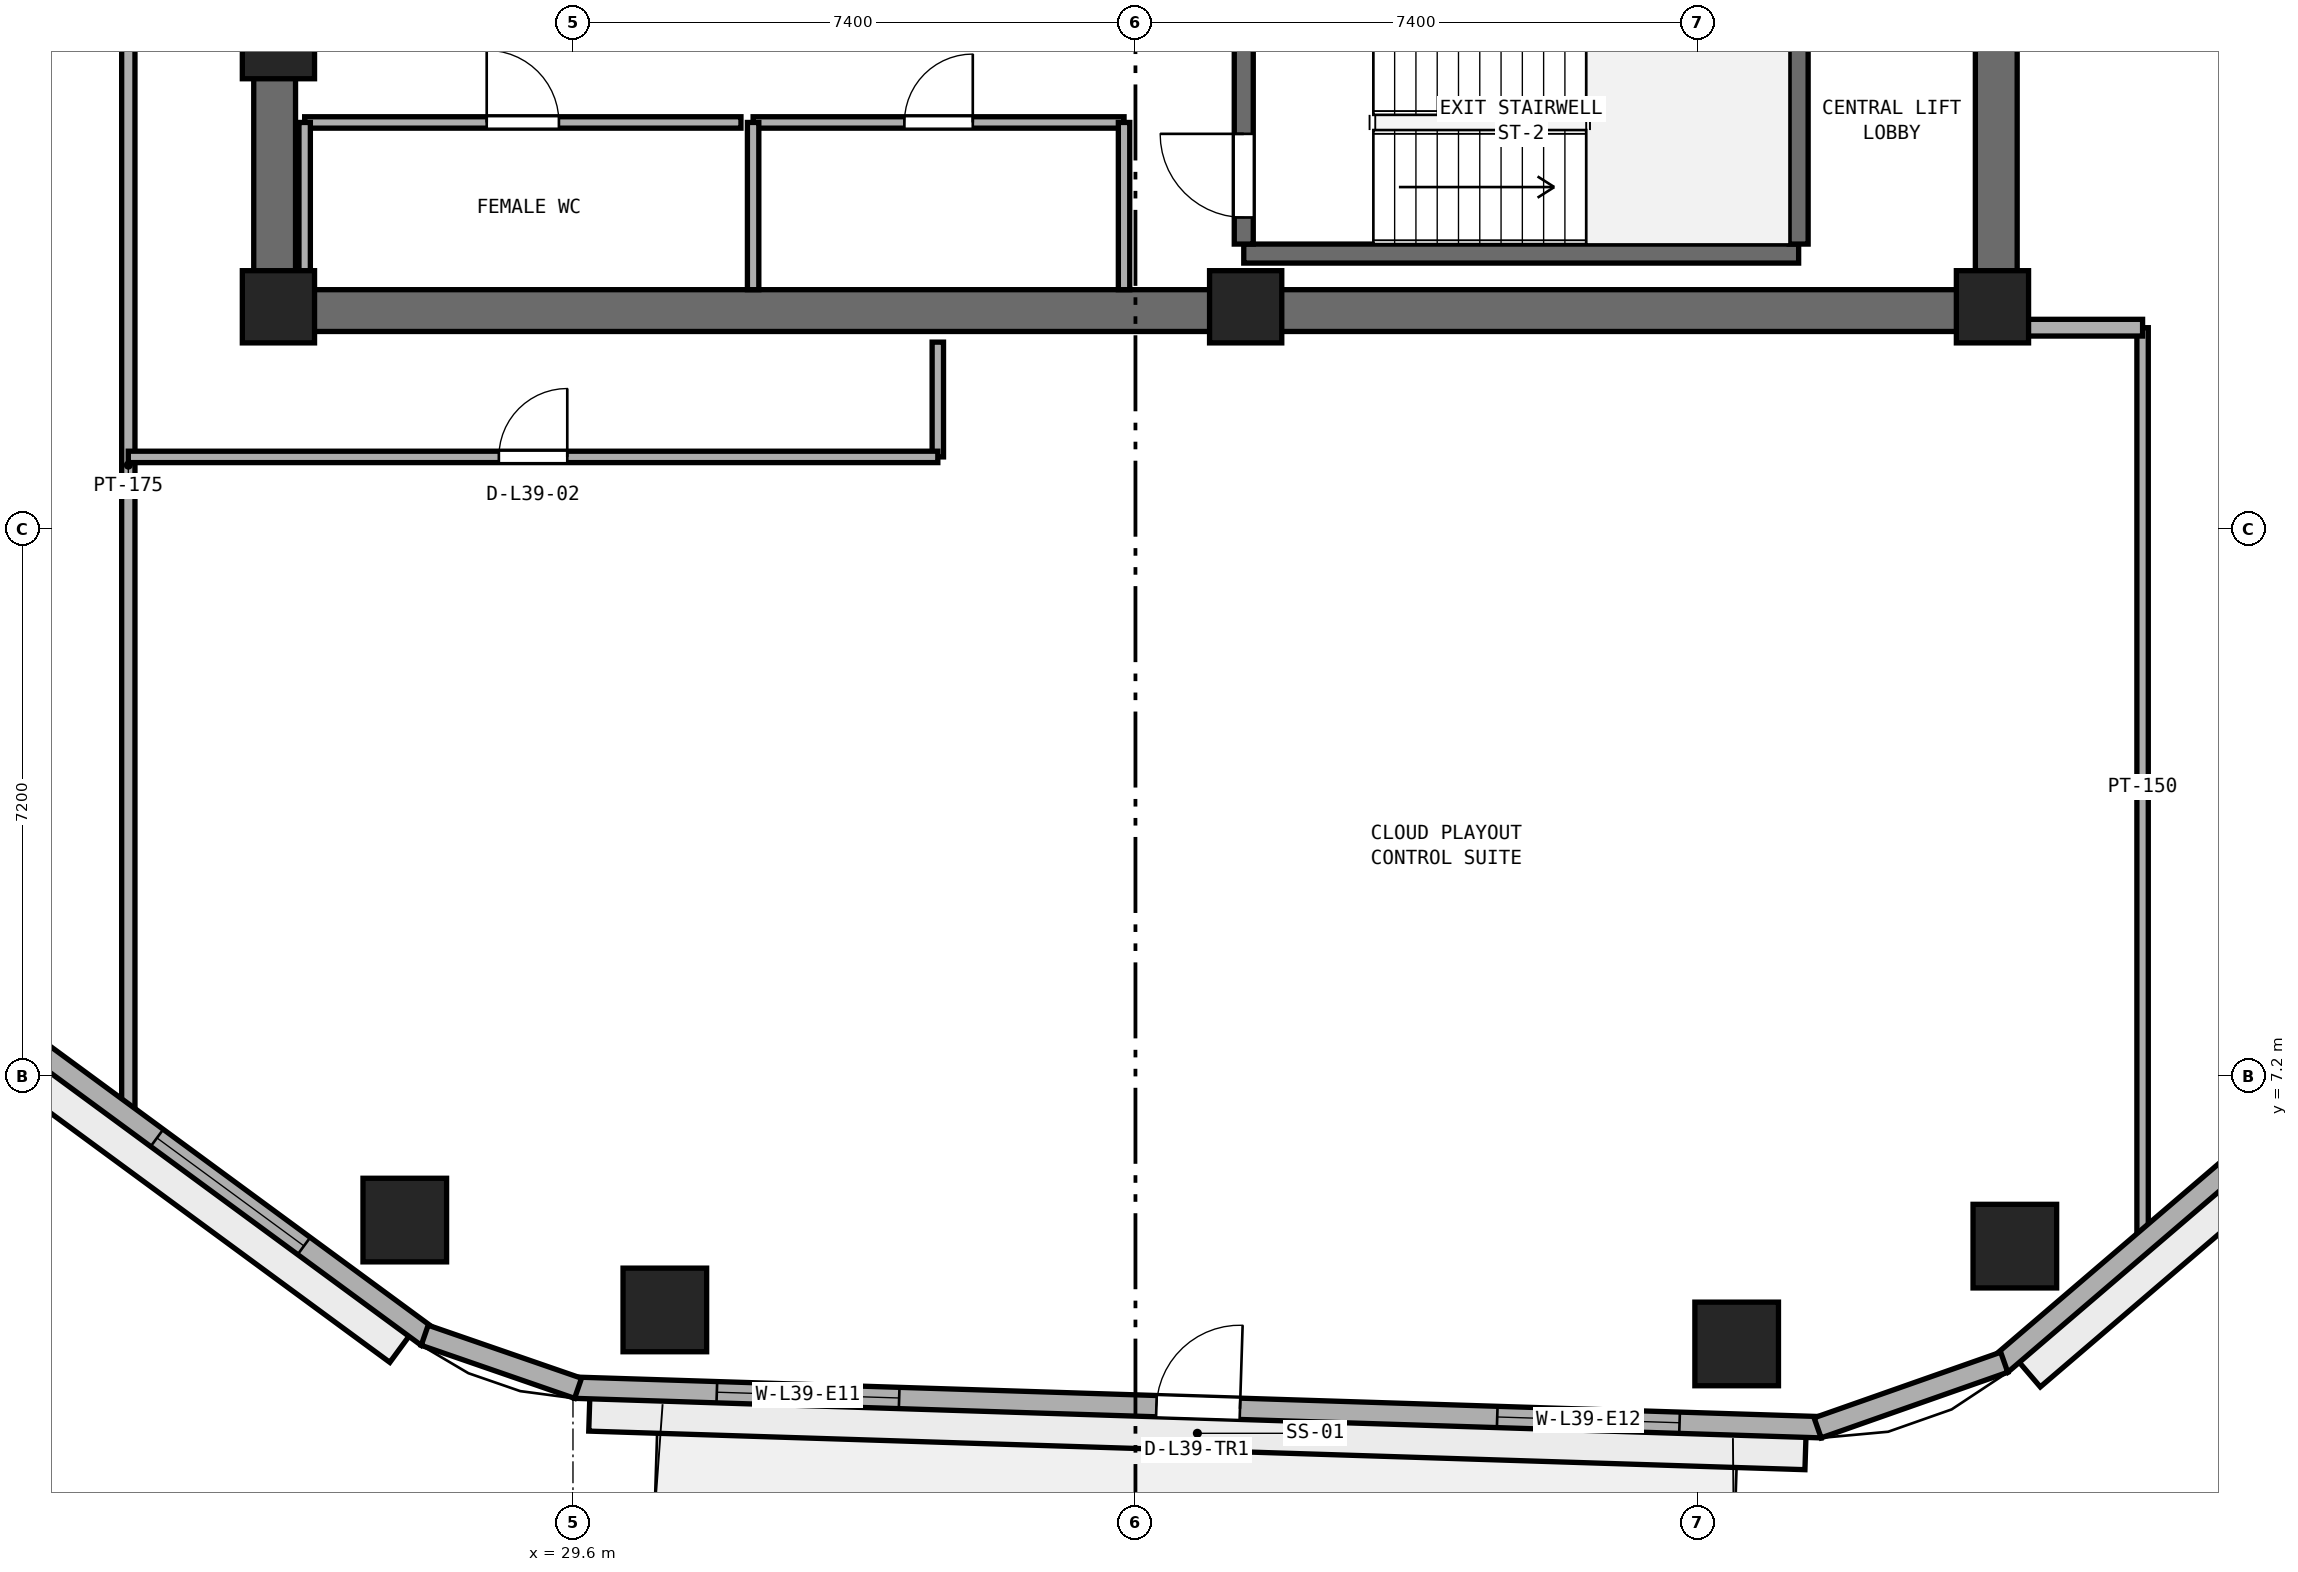
"""IFC4 building model, lengths in metres.
Left out: names, types, materials, properties, quantities, classifications, styles, units other than length and angle.
Written with IfcOpenShell. Run it as: python <this file> out.ifc"""

import sys

from ifc_helpers import new_model, si_unit, direction, frame, frame_2d, origin, origin_2d, place, context, subcontext, project, spatial, rectangle, extrude, element, fill, save


model = new_model("IFC4")
c1 = context("Model", 3, precision=1e-05, world=origin(), true_north=direction((0.0, 1.0)))
c2 = subcontext(c1, "Body", "Model", "MODEL_VIEW")
j1 = project(units=[si_unit("LENGTHUNIT", "METRE"), si_unit("PLANEANGLEUNIT", "RADIAN")], contexts=[c1])
p1 = place(None, origin())
s1 = spatial("IfcSite", under=j1, at=p1, CompositionType="ELEMENT")
p2 = place(p1, origin())
s2 = spatial("IfcBuilding", under=s1, at=p2, CompositionType="ELEMENT")
p3 = place(p2, frame((0.0, 0.0, 155.4)))
s3 = spatial("IfcBuildingStorey", under=s2, at=p3, CompositionType="ELEMENT", Elevation=155.4)
p4 = place(p3, frame((25.4, 17.275, 0.0), z_axis=(0.0, 0.0, 1.0), x_axis=(1.0, 0.0, 0.0)))
e1 = element("IfcWall", 1, at=p4, inside=s3, PredefinedType="SHEAR", context=c2, shape_type="SweptSolid", body=[
    extrude(rectangle(XDim=23.2, YDim=0.55, at=frame_2d((11.6, 0.0))), origin(), (0.0, 0.0, 1.0), 3.54),
])
p5 = place(p3, frame((25.675, 17.55, 0.0), z_axis=(0.0, 0.0, 1.0), x_axis=(0.0, 1.0, 0.0)))
e2 = element("IfcWall", 2, at=p5, inside=s3, PredefinedType="SHEAR", context=c2, shape_type="SweptSolid", body=[
    extrude(rectangle(XDim=15.3, YDim=0.55, at=frame_2d((7.65, 0.0))), origin(), (0.0, 0.0, 1.0), 3.54),
])
p6 = place(p5, frame((6.9, 0.0, 0.0)))
e3 = element("IfcOpeningElement", 3, at=p6, cuts=e2, PredefinedType="OPENING", context=c2, shape_type="SweptSolid", body=[
    extrude(rectangle(XDim=1.5, YDim=2.15, at=frame_2d((0.75, 1.075))), frame((0.0, 0.285, 0.0), z_axis=(0.0, -1.0, 0.0), x_axis=(1.0, 0.0, 0.0)), (0.0, 0.0, 1.0), 0.57),
])
p7 = place(p3, frame((48.325, 17.55, 0.0), z_axis=(0.0, 0.0, 1.0), x_axis=(0.0, 1.0, 0.0)))
e4 = element("IfcWall", 4, at=p7, inside=s3, PredefinedType="SHEAR", context=c2, shape_type="SweptSolid", body=[
    extrude(rectangle(XDim=15.3, YDim=0.55, at=frame_2d((7.65, 0.0))), origin(), (0.0, 0.0, 1.0), 3.54),
])
p8 = place(p7, frame((5.75, 0.0, 0.0)))
e5 = element("IfcOpeningElement", 5, at=p8, cuts=e4, PredefinedType="OPENING", context=c2, shape_type="SweptSolid", body=[
    extrude(rectangle(XDim=1.5, YDim=2.15, at=frame_2d((0.75, 1.075))), frame((0.0, 0.285, 0.0), z_axis=(0.0, -1.0, 0.0), x_axis=(1.0, 0.0, 0.0)), (0.0, 0.0, 1.0), 0.57),
])
for number, where, z_axis, x_axis in (
    (6, (25.725, 17.325, 0.0), (0.0, 0.0, 1.0), (1.0, 0.0, 0.0)),
    (7, (38.45, 17.325, 0.0), (0.0, 0.0, 1.0), (1.0, 0.0, 0.0)),
    (8, (48.275, 17.325, 0.0), (0.0, 0.0, 1.0), (1.0, 0.0, 0.0)),
    (9, (25.725, 20.8, 0.0), (0.0, 0.0, 1.0), (1.0, 0.0, 0.0)),
):
    element("IfcColumn", number, at=place(p3, frame(where, z_axis=z_axis, x_axis=x_axis)), inside=s3, PredefinedType="PILASTER", context=c2, shape_type="SweptSolid", body=[
        extrude(rectangle(XDim=0.95, YDim=0.95, at=origin_2d()), origin(), (0.0, 0.0, 1.0), 3.8),
    ])
for number, where, z_axis, x_axis in (
    (10, (30.809, 4.127, 0.0), (0.0, 0.0, 1.0), (1.0, 0.0, 0.0)),
    (11, (44.91, 3.68, 0.0), (0.0, 0.0, 1.0), (1.0, 0.0, 0.0)),
    (12, (48.57, 4.967, 0.0), (0.0, 0.0, 1.0), (1.0, 0.0, 0.0)),
    (13, (27.387, 5.31, 0.0), (0.0, 0.0, 1.0), (1.0, 0.0, 0.0)),
):
    element("IfcColumn", number, at=place(p3, frame(where, z_axis=z_axis, x_axis=x_axis)), inside=s3, PredefinedType="COLUMN", context=c2, shape_type="SweptSolid", body=[
        extrude(rectangle(XDim=1.1, YDim=1.1, at=origin_2d()), origin(), (0.0, 0.0, 1.0), 3.8),
    ])
p9 = place(p3, frame((38.425, 18.025, 0.0), z_axis=(0.0, 0.0, 1.0), x_axis=(1.0, 0.0, 0.0)))
e14 = element("IfcWall", 14, at=p9, inside=s3, PredefinedType="SHEAR", context=c2, shape_type="SweptSolid", body=[
    extrude(rectangle(XDim=7.3, YDim=0.25, at=frame_2d((3.65, 0.0))), origin(), (0.0, 0.0, 1.0), 3.54),
])
p10 = place(p3, frame((38.425, 18.15, 0.0), z_axis=(0.0, 0.0, 1.0), x_axis=(0.0, 1.0, 0.0)))
e15 = element("IfcWall", 15, at=p10, inside=s3, PredefinedType="SHEAR", context=c2, shape_type="SweptSolid", body=[
    extrude(rectangle(XDim=3.2, YDim=0.25, at=frame_2d((1.6, 0.0))), origin(), (0.0, 0.0, 1.0), 3.54),
])
p11 = place(p10, frame((0.35, 0.0, 0.0)))
e16 = element("IfcOpeningElement", 16, at=p11, cuts=e15, PredefinedType="OPENING", context=c2, shape_type="SweptSolid", body=[
    extrude(rectangle(XDim=1.1, YDim=2.15, at=frame_2d((0.55, 1.075))), frame((0.0, 0.135, 0.0), z_axis=(0.0, -1.0, 0.0), x_axis=(1.0, 0.0, 0.0)), (0.0, 0.0, 1.0), 0.27),
])
p12 = place(p3, frame((45.725, 18.15, 0.0), z_axis=(0.0, 0.0, 1.0), x_axis=(0.0, 1.0, 0.0)))
e17 = element("IfcWall", 17, at=p12, inside=s3, PredefinedType="SHEAR", context=c2, shape_type="SweptSolid", body=[
    extrude(rectangle(XDim=3.2, YDim=0.25, at=frame_2d((1.6, 0.0))), origin(), (0.0, 0.0, 1.0), 3.54),
])
p13 = place(p3, frame((26.07, 19.75, 0.0), z_axis=(0.0, 0.0, 1.0), x_axis=(1.0, 0.0, 0.0)))
e18 = element("IfcWall", 18, at=p13, inside=s3, PredefinedType="PARTITIONING", context=c2, shape_type="SweptSolid", body=[
    extrude(rectangle(XDim=5.74, YDim=0.15, at=frame_2d((2.87, 0.0))), origin(), (0.0, 0.0, 1.0), 3.54),
])
p14 = place(p13, frame((2.395, 0.0, 0.0)))
e19 = element("IfcOpeningElement", 19, at=p14, cuts=e18, PredefinedType="OPENING", context=c2, shape_type="SweptSolid", body=[
    extrude(rectangle(XDim=0.95, YDim=2.1, at=frame_2d((0.475, 1.05))), frame((0.0, 0.085, 0.0), z_axis=(0.0, -1.0, 0.0), x_axis=(1.0, 0.0, 0.0)), (0.0, 0.0, 1.0), 0.17),
])
p15 = place(p3, frame((26.07, 17.55, 0.0), z_axis=(0.0, 0.0, 1.0), x_axis=(0.0, 1.0, 0.0)))
e20 = element("IfcWall", 20, at=p15, inside=s3, PredefinedType="PARTITIONING", context=c2, shape_type="SweptSolid", body=[
    extrude(rectangle(XDim=2.2, YDim=0.15, at=frame_2d((1.1, 0.0))), origin(), (0.0, 0.0, 1.0), 2.64),
])
p16 = place(p3, frame((31.97, 19.75, 0.0), z_axis=(0.0, 0.0, 1.0), x_axis=(1.0, 0.0, 0.0)))
e21 = element("IfcWall", 21, at=p16, inside=s3, PredefinedType="PARTITIONING", context=c2, shape_type="SweptSolid", body=[
    extrude(rectangle(XDim=4.88, YDim=0.15, at=frame_2d((2.44, 0.0))), origin(), (0.0, 0.0, 1.0), 3.54),
])
p17 = place(p16, frame((1.99, 0.0, 0.0)))
e22 = element("IfcOpeningElement", 22, at=p17, cuts=e21, PredefinedType="OPENING", context=c2, shape_type="SweptSolid", body=[
    extrude(rectangle(XDim=0.9, YDim=2.1, at=frame_2d((0.45, 1.05))), frame((0.0, 0.085, 0.0), z_axis=(0.0, -1.0, 0.0), x_axis=(1.0, 0.0, 0.0)), (0.0, 0.0, 1.0), 0.17),
])
for number, where, z_axis, x_axis in (
    (23, (31.97, 17.55, 0.0), (0.0, 0.0, 1.0), (0.0, 1.0, 0.0)),
    (24, (36.85, 17.55, 0.0), (0.0, 0.0, 1.0), (0.0, 1.0, 0.0)),
):
    element("IfcWall", number, at=place(p3, frame(where, z_axis=z_axis, x_axis=x_axis)), inside=s3, PredefinedType="PARTITIONING", context=c2, shape_type="SweptSolid", body=[
        extrude(rectangle(XDim=2.2, YDim=0.15, at=frame_2d((1.1, 0.0))), origin(), (0.0, 0.0, 1.0), 3.54),
    ])
p18 = place(p3, frame((50.25, 4.966, 0.0), z_axis=(0.0, 0.0, 1.0), x_axis=(0.0, 1.0, 0.0)))
e25 = element("IfcWall", 25, at=p18, inside=s3, PredefinedType="PARTITIONING", context=c2, shape_type="SweptSolid", body=[
    extrude(rectangle(XDim=12.084, YDim=0.15, at=frame_2d((6.042, 0.0))), origin(), (0.0, 0.0, 1.0), 3.54),
])
p19 = place(p3, frame((34.4, 15.35, 0.0), z_axis=(0.0, 0.0, 1.0), x_axis=(0.0, 1.0, 0.0)))
e26 = element("IfcWall", 26, at=p19, inside=s3, PredefinedType="PARTITIONING", context=c2, shape_type="SweptSolid", body=[
    extrude(rectangle(XDim=1.51, YDim=0.15, at=frame_2d((0.755, 0.0))), origin(), (0.0, 0.0, 1.0), 3.54),
])
p20 = place(p3, frame((23.75, 6.634, 0.0), z_axis=(0.0, 0.0, 1.0), x_axis=(0.0, 1.0, 0.0)))
e27 = element("IfcWall", 27, at=p20, inside=s3, PredefinedType="PARTITIONING", context=c2, shape_type="SweptSolid", body=[
    extrude(rectangle(XDim=17.216, YDim=0.175, at=frame_2d((8.608, 0.0))), origin(), (0.0, 0.0, 1.0), 3.54),
])
p21 = place(p3, frame((23.75, 15.35, 0.0), z_axis=(0.0, 0.0, 1.0), x_axis=(1.0, 0.0, 0.0)))
e28 = element("IfcWall", 28, at=p21, inside=s3, PredefinedType="PARTITIONING", context=c2, shape_type="SweptSolid", body=[
    extrude(rectangle(XDim=10.65, YDim=0.15, at=frame_2d((5.325, 0.0))), origin(), (0.0, 0.0, 1.0), 3.54),
])
p22 = place(p21, frame((4.875, 0.0, 0.0)))
e29 = element("IfcOpeningElement", 29, at=p22, cuts=e28, PredefinedType="OPENING", context=c2, shape_type="SweptSolid", body=[
    extrude(rectangle(XDim=0.9, YDim=2.1, at=frame_2d((0.45, 1.05))), frame((0.0, 0.085, 0.0), z_axis=(0.0, -1.0, 0.0), x_axis=(1.0, 0.0, 0.0)), (0.0, 0.0, 1.0), 0.17),
])
p23 = place(p3, frame((48.74, 17.05, 0.0), z_axis=(0.0, 0.0, 1.0), x_axis=(1.0, 0.0, 0.0)))
e30 = element("IfcWall", 30, at=p23, inside=s3, PredefinedType="PARTITIONING", context=c2, shape_type="SweptSolid", body=[
    extrude(rectangle(XDim=1.51, YDim=0.22, at=frame_2d((0.755, 0.0))), origin(), (0.0, 0.0, 1.0), 2.923),
])
p24 = place(p3, frame((29.625, 3.104, 0.0), z_axis=(0.0, 0.0, 1.0), x_axis=(0.99949718661, -0.031707632487, 0.0)))
e31 = element("IfcWall", 31, at=p24, inside=s3, PredefinedType="STANDARD", context=c2, shape_type="SweptSolid", body=[
    extrude(rectangle(XDim=16.408, YDim=0.28, at=frame_2d((8.204, 0.0))), origin(), (0.0, 0.0, 1.0), 3.54),
])
p25 = place(p24, frame((7.654, 0.0, 0.0)))
e32 = element("IfcOpeningElement", 32, at=p25, cuts=e31, PredefinedType="OPENING", context=c2, shape_type="SweptSolid", body=[
    extrude(rectangle(XDim=1.1, YDim=2.2, at=frame_2d((0.55, 1.1))), frame((0.0, 0.15, 0.0), z_axis=(0.0, -1.0, 0.0), x_axis=(1.0, 0.0, 0.0)), (0.0, 0.0, 1.0), 0.3),
])
p26 = place(p24, frame((1.868, 0.0, 0.9)))
e33 = element("IfcOpeningElement", 33, at=p26, cuts=e31, PredefinedType="OPENING", context=c2, shape_type="SweptSolid", body=[
    extrude(rectangle(XDim=2.4, YDim=1.75, at=frame_2d((1.2, 0.875))), frame((0.0, 0.15, 0.0), z_axis=(0.0, -1.0, 0.0), x_axis=(1.0, 0.0, 0.0)), (0.0, 0.0, 1.0), 0.3),
])
p27 = place(p24, frame((12.14, 0.0, 0.9)))
e34 = element("IfcOpeningElement", 34, at=p27, cuts=e31, PredefinedType="OPENING", context=c2, shape_type="SweptSolid", body=[
    extrude(rectangle(XDim=2.4, YDim=1.75, at=frame_2d((1.2, 0.875))), frame((0.0, 0.15, 0.0), z_axis=(0.0, -1.0, 0.0), x_axis=(1.0, 0.0, 0.0)), (0.0, 0.0, 1.0), 0.3),
])
p28 = place(p3, frame((48.385, 3.414, 0.0), z_axis=(0.0, 0.0, 1.0), x_axis=(0.759700260779, 0.650273414628, 0.0)))
e35 = element("IfcWall", 35, at=p28, inside=s3, PredefinedType="STANDARD", context=c2, shape_type="SweptSolid", body=[
    extrude(rectangle(XDim=15.881, YDim=0.28, at=frame_2d((7.94, 0.0))), origin(), (0.0, 0.0, 1.0), 3.54),
])
p29 = place(p28, frame((6.74, 0.0, 0.9)))
e36 = element("IfcOpeningElement", 36, at=p29, cuts=e35, PredefinedType="OPENING", context=c2, shape_type="SweptSolid", body=[
    extrude(rectangle(XDim=2.4, YDim=1.75, at=frame_2d((1.2, 0.875))), frame((0.0, 0.15, 0.0), z_axis=(0.0, -1.0, 0.0), x_axis=(1.0, 0.0, 0.0)), (0.0, 0.0, 1.0), 0.3),
])
p30 = place(p28, frame((11.451, 0.0, 0.9)))
e37 = element("IfcOpeningElement", 37, at=p30, cuts=e35, PredefinedType="OPENING", context=c2, shape_type="SweptSolid", body=[
    extrude(rectangle(XDim=2.4, YDim=1.75, at=frame_2d((1.2, 0.875))), frame((0.0, 0.15, 0.0), z_axis=(0.0, -1.0, 0.0), x_axis=(1.0, 0.0, 0.0)), (0.0, 0.0, 1.0), 0.3),
])
p31 = place(p3, frame((14.951, 13.134, 0.0), z_axis=(0.0, 0.0, 1.0), x_axis=(0.805804940328, -0.592181051827, 0.0)))
e38 = element("IfcWall", 38, at=p31, inside=s3, PredefinedType="STANDARD", context=c2, shape_type="SweptSolid", body=[
    extrude(rectangle(XDim=15.804, YDim=0.28, at=frame_2d((7.902, 0.0))), origin(), (0.0, 0.0, 1.0), 3.54),
])
p32 = place(p31, frame((2.017, 0.0, 0.9)))
e39 = element("IfcOpeningElement", 39, at=p32, cuts=e38, PredefinedType="OPENING", context=c2, shape_type="SweptSolid", body=[
    extrude(rectangle(XDim=2.4, YDim=1.75, at=frame_2d((1.2, 0.875))), frame((0.0, 0.15, 0.0), z_axis=(0.0, -1.0, 0.0), x_axis=(1.0, 0.0, 0.0)), (0.0, 0.0, 1.0), 0.3),
])
p33 = place(p31, frame((6.702, 0.0, 0.9)))
e40 = element("IfcOpeningElement", 40, at=p33, cuts=e38, PredefinedType="OPENING", context=c2, shape_type="SweptSolid", body=[
    extrude(rectangle(XDim=2.4, YDim=1.75, at=frame_2d((1.2, 0.875))), frame((0.0, 0.15, 0.0), z_axis=(0.0, -1.0, 0.0), x_axis=(1.0, 0.0, 0.0)), (0.0, 0.0, 1.0), 0.3),
])
p34 = place(p31, frame((11.387, 0.0, 0.9)))
e41 = element("IfcOpeningElement", 41, at=p34, cuts=e38, PredefinedType="OPENING", context=c2, shape_type="SweptSolid", body=[
    extrude(rectangle(XDim=2.4, YDim=1.75, at=frame_2d((1.2, 0.875))), frame((0.0, 0.15, 0.0), z_axis=(0.0, -1.0, 0.0), x_axis=(1.0, 0.0, 0.0)), (0.0, 0.0, 1.0), 0.3),
])
p35 = place(p3, frame((45.975, 2.576, 0.0), z_axis=(0.0, 0.0, 1.0), x_axis=(0.943377643365, 0.331720698781, 0.0)))
e42 = element("IfcWall", 42, at=p35, inside=s3, PredefinedType="STANDARD", context=c2, shape_type="SweptSolid", body=[
    extrude(rectangle(XDim=2.603, YDim=0.28, at=frame_2d((1.301, 0.0))), origin(), (0.0, 0.0, 1.0), 3.54),
])
p36 = place(p3, frame((27.649, 3.794, 0.0), z_axis=(0.0, 0.0, 1.0), x_axis=(0.945149124969, -0.326639145802, 0.0)))
e43 = element("IfcWall", 43, at=p36, inside=s3, PredefinedType="STANDARD", context=c2, shape_type="SweptSolid", body=[
    extrude(rectangle(XDim=2.135, YDim=0.28, at=frame_2d((1.067, 0.0))), origin(), (0.0, 0.0, 1.0), 3.54),
])
p37 = place(p11, origin())
e44 = element("IfcDoor", 44, at=p37, inside=s3, OperationType="SINGLE_SWING_RIGHT", PredefinedType="DOOR", context=c2, shape_type="SweptSolid", body=[
    extrude(rectangle(XDim=1.1, YDim=2.15, at=frame_2d((0.55, 1.075))), frame((0.0, 0.025, 0.0), z_axis=(0.0, -1.0, 0.0), x_axis=(1.0, 0.0, 0.0)), (0.0, 0.0, 1.0), 0.05),
])
fill(e16, e44)
p38 = place(p14, origin())
e45 = element("IfcDoor", 45, at=p38, inside=s3, OperationType="SINGLE_SWING_LEFT", PredefinedType="DOOR", context=c2, shape_type="SweptSolid", body=[
    extrude(rectangle(XDim=0.95, YDim=2.1, at=frame_2d((0.475, 1.05))), frame((0.0, 0.025, 0.0), z_axis=(0.0, -1.0, 0.0), x_axis=(1.0, 0.0, 0.0)), (0.0, 0.0, 1.0), 0.05),
])
fill(e19, e45)
p39 = place(p17, origin())
e46 = element("IfcDoor", 46, at=p39, inside=s3, OperationType="SINGLE_SWING_RIGHT", PredefinedType="DOOR", context=c2, shape_type="SweptSolid", body=[
    extrude(rectangle(XDim=0.9, YDim=2.1, at=frame_2d((0.45, 1.05))), frame((0.0, 0.025, 0.0), z_axis=(0.0, -1.0, 0.0), x_axis=(1.0, 0.0, 0.0)), (0.0, 0.0, 1.0), 0.05),
])
fill(e22, e46)
p40 = place(p22, origin())
e47 = element("IfcDoor", 47, at=p40, inside=s3, OperationType="SINGLE_SWING_RIGHT", PredefinedType="DOOR", context=c2, shape_type="SweptSolid", body=[
    extrude(rectangle(XDim=0.9, YDim=2.1, at=frame_2d((0.45, 1.05))), frame((0.0, 0.025, 0.0), z_axis=(0.0, -1.0, 0.0), x_axis=(1.0, 0.0, 0.0)), (0.0, 0.0, 1.0), 0.05),
])
fill(e29, e47)
p41 = place(p25, origin())
e48 = element("IfcDoor", 48, at=p41, inside=s3, OperationType="SINGLE_SWING_RIGHT", PredefinedType="DOOR", context=c2, shape_type="SweptSolid", body=[
    extrude(rectangle(XDim=1.1, YDim=2.2, at=frame_2d((0.55, 1.1))), frame((0.0, 0.025, 0.0), z_axis=(0.0, -1.0, 0.0), x_axis=(1.0, 0.0, 0.0)), (0.0, 0.0, 1.0), 0.05),
])
fill(e32, e48)
p42 = place(p26, origin())
e49 = element("IfcWindow", 49, at=p42, inside=s3, PartitioningType="SINGLE_PANEL", PredefinedType="WINDOW", context=c2, shape_type="SweptSolid", body=[
    extrude(rectangle(XDim=2.4, YDim=1.75, at=frame_2d((1.2, 0.875))), frame((0.0, 0.03, 0.0), z_axis=(0.0, -1.0, 0.0), x_axis=(1.0, 0.0, 0.0)), (0.0, 0.0, 1.0), 0.06),
])
fill(e33, e49)
p43 = place(p27, origin())
e50 = element("IfcWindow", 50, at=p43, inside=s3, PartitioningType="SINGLE_PANEL", PredefinedType="WINDOW", context=c2, shape_type="SweptSolid", body=[
    extrude(rectangle(XDim=2.4, YDim=1.75, at=frame_2d((1.2, 0.875))), frame((0.0, 0.03, 0.0), z_axis=(0.0, -1.0, 0.0), x_axis=(1.0, 0.0, 0.0)), (0.0, 0.0, 1.0), 0.06),
])
fill(e34, e50)
p44 = place(p34, origin())
e51 = element("IfcWindow", 51, at=p44, inside=s3, PartitioningType="SINGLE_PANEL", PredefinedType="WINDOW", context=c2, shape_type="SweptSolid", body=[
    extrude(rectangle(XDim=2.4, YDim=1.75, at=frame_2d((1.2, 0.875))), frame((0.0, 0.03, 0.0), z_axis=(0.0, -1.0, 0.0), x_axis=(1.0, 0.0, 0.0)), (0.0, 0.0, 1.0), 0.06),
])
fill(e41, e51)
save(model, sys.argv[1])
